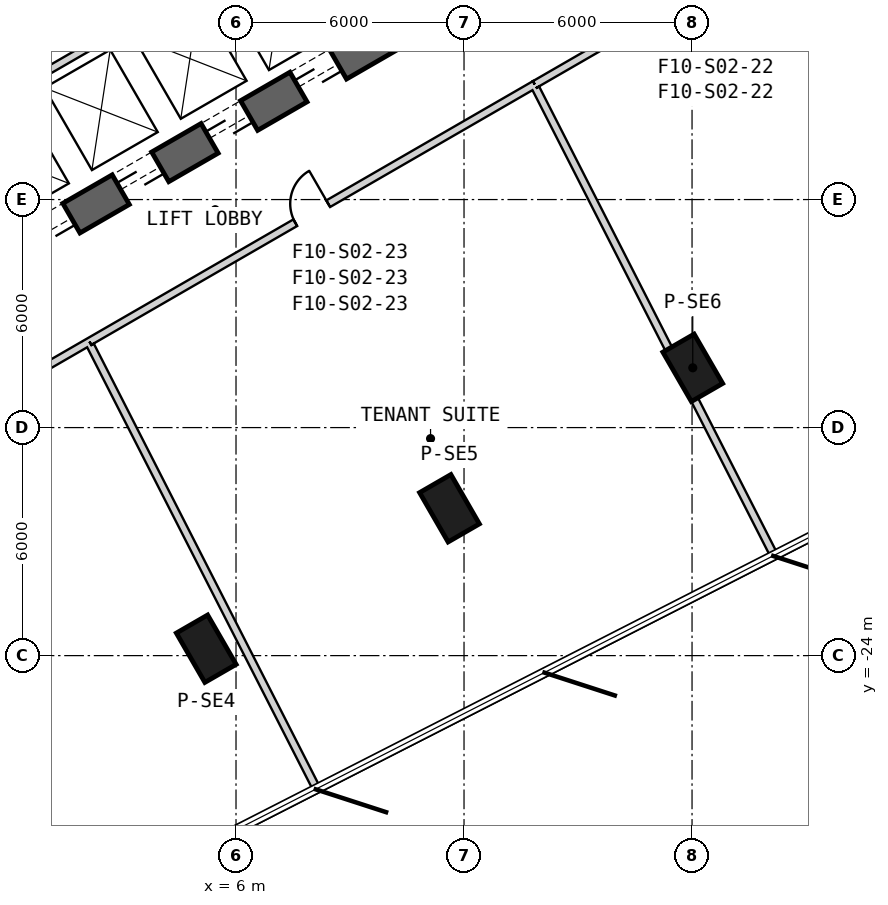
"""IFC4 building model, lengths in metres.
Left out: names, types, materials, properties, quantities, classifications, styles, units other than length and angle.
Written with IfcOpenShell. Run it as: python <this file> out.ifc"""

import sys

from ifc_helpers import new_model, si_unit, direction, frame, frame_2d, origin, origin_2d, place, context, subcontext, project, spatial, rectangle, extrude, element, fill, save


model = new_model("IFC4")
c1 = context("Model", 3, precision=1e-05, world=origin(), true_north=direction((0.0, 1.0)))
c2 = subcontext(c1, "Body", "Model", "MODEL_VIEW")
j1 = project(units=[si_unit("LENGTHUNIT", "METRE"), si_unit("PLANEANGLEUNIT", "RADIAN")], contexts=[c1])
p1 = place(None, origin())
s1 = spatial("IfcSite", under=j1, at=p1, CompositionType="ELEMENT")
p2 = place(p1, origin())
s2 = spatial("IfcBuilding", under=s1, at=p2, CompositionType="ELEMENT")
p3 = place(p2, frame((0.0, 0.0, 70.1)))
s3 = spatial("IfcBuildingStorey", under=s2, at=p3, CompositionType="ELEMENT", Elevation=70.1)
for number, where, z_axis, x_axis in (
    (1, (5.217, -23.818, 0.0), (0.0, 0.0, 1.0), (0.5, -0.866, 0.0)),
    (2, (11.618, -20.123, 0.0), (0.0, 0.0, 1.0), (0.5, -0.866, 0.0)),
    (3, (18.019, -16.427, 0.0), (0.0, 0.0, 1.0), (0.5, -0.866, 0.0)),
):
    element("IfcColumn", number, at=place(p3, frame(where, z_axis=z_axis, x_axis=x_axis)), inside=s3, PredefinedType="COLUMN", context=c2, shape_type="SweptSolid", body=[
        extrude(rectangle(XDim=1.5, YDim=0.95, at=origin_2d()), origin(), (0.0, 0.0, 1.0), 4.1),
    ])
p4 = place(p3, frame((-7.825, -17.97, 0.0), z_axis=(0.0, 0.0, 1.0), x_axis=(0.866028369851, 0.499994862586, 0.0)))
e4 = element("IfcWall", 4, at=p4, inside=s3, PredefinedType="SHEAR", context=c2, shape_type="SweptSolid", body=[
    extrude(rectangle(XDim=31.523, YDim=0.9, at=frame_2d((15.762, 0.0))), origin(), (0.0, 0.0, 1.0), 4.1),
])
p5 = place(p4, frame((7.062, 0.0, 0.0)))
e5 = element("IfcOpeningElement", 5, at=p5, cuts=e4, PredefinedType="OPENING", context=c2, shape_type="SweptSolid", body=[
    extrude(rectangle(XDim=1.2, YDim=2.4, at=frame_2d((0.6, 1.2))), frame((0.0, 0.46, 0.0), z_axis=(0.0, -1.0, 0.0), x_axis=(1.0, 0.0, 0.0)), (0.0, 0.0, 1.0), 0.92),
])
p6 = place(p4, frame((9.762, 0.0, 0.0)))
e6 = element("IfcOpeningElement", 6, at=p6, cuts=e4, PredefinedType="OPENING", context=c2, shape_type="SweptSolid", body=[
    extrude(rectangle(XDim=1.2, YDim=2.4, at=frame_2d((0.6, 1.2))), frame((0.0, 0.46, 0.0), z_axis=(0.0, -1.0, 0.0), x_axis=(1.0, 0.0, 0.0)), (0.0, 0.0, 1.0), 0.92),
])
p7 = place(p4, frame((12.462, 0.0, 0.0)))
e7 = element("IfcOpeningElement", 7, at=p7, cuts=e4, PredefinedType="OPENING", context=c2, shape_type="SweptSolid", body=[
    extrude(rectangle(XDim=1.2, YDim=2.4, at=frame_2d((0.6, 1.2))), frame((0.0, 0.46, 0.0), z_axis=(0.0, -1.0, 0.0), x_axis=(1.0, 0.0, 0.0)), (0.0, 0.0, 1.0), 0.92),
])
p8 = place(p4, frame((15.162, 0.0, 0.0)))
e8 = element("IfcOpeningElement", 8, at=p8, cuts=e4, PredefinedType="OPENING", context=c2, shape_type="SweptSolid", body=[
    extrude(rectangle(XDim=1.2, YDim=2.4, at=frame_2d((0.6, 1.2))), frame((0.0, 0.46, 0.0), z_axis=(0.0, -1.0, 0.0), x_axis=(1.0, 0.0, 0.0)), (0.0, 0.0, 1.0), 0.92),
])
p9 = place(p4, frame((17.862, 0.0, 0.0)))
e9 = element("IfcOpeningElement", 9, at=p9, cuts=e4, PredefinedType="OPENING", context=c2, shape_type="SweptSolid", body=[
    extrude(rectangle(XDim=1.2, YDim=2.4, at=frame_2d((0.6, 1.2))), frame((0.0, 0.46, 0.0), z_axis=(0.0, -1.0, 0.0), x_axis=(1.0, 0.0, 0.0)), (0.0, 0.0, 1.0), 0.92),
])
p10 = place(p4, frame((20.562, 0.0, 0.0)))
e10 = element("IfcOpeningElement", 10, at=p10, cuts=e4, PredefinedType="OPENING", context=c2, shape_type="SweptSolid", body=[
    extrude(rectangle(XDim=1.2, YDim=2.4, at=frame_2d((0.6, 1.2))), frame((0.0, 0.46, 0.0), z_axis=(0.0, -1.0, 0.0), x_axis=(1.0, 0.0, 0.0)), (0.0, 0.0, 1.0), 0.92),
])
p11 = place(p4, frame((26.712, 0.0, 0.0)))
e11 = element("IfcOpeningElement", 11, at=p11, cuts=e4, PredefinedType="OPENING", context=c2, shape_type="SweptSolid", body=[
    extrude(rectangle(XDim=1.2, YDim=2.4, at=frame_2d((0.6, 1.2))), frame((0.0, 0.46, 0.0), z_axis=(0.0, -1.0, 0.0), x_axis=(1.0, 0.0, 0.0)), (0.0, 0.0, 1.0), 0.92),
])
p12 = place(p4, frame((3.612, 0.0, 0.0)))
e12 = element("IfcOpeningElement", 12, at=p12, cuts=e4, PredefinedType="OPENING", context=c2, shape_type="SweptSolid", body=[
    extrude(rectangle(XDim=1.2, YDim=2.4, at=frame_2d((0.6, 1.2))), frame((0.0, 0.46, 0.0), z_axis=(0.0, -1.0, 0.0), x_axis=(1.0, 0.0, 0.0)), (0.0, 0.0, 1.0), 0.92),
])
p13 = place(p3, frame((0.483, -8.936, 0.0), z_axis=(0.0, 0.0, 1.0), x_axis=(0.866030989016, 0.499990325971, 0.0)))
e13 = element("IfcWall", 13, at=p13, inside=s3, PredefinedType="PLUMBINGWALL", context=c2, shape_type="SweptSolid", body=[
    extrude(rectangle(XDim=8.1, YDim=0.2, at=frame_2d((4.05, 0.0))), origin(), (0.0, 0.0, 1.0), 3.8),
])
p14 = place(p3, frame((-6.852, -20.93, 0.0), z_axis=(0.0, 0.0, 1.0), x_axis=(0.866021591072, 0.500006603753, 0.0)))
e14 = element("IfcWall", 14, at=p14, inside=s3, PredefinedType="PARTITIONING", context=c2, shape_type="SweptSolid", body=[
    extrude(rectangle(XDim=10.387, YDim=0.2, at=frame_2d((5.194, 0.0))), origin(), (0.0, 0.0, 1.0), 2.98),
])
p15 = place(p14, frame((4.732, 0.0, 0.0)))
e15 = element("IfcOpeningElement", 15, at=p15, cuts=e14, PredefinedType="OPENING", context=c2, shape_type="SweptSolid", body=[
    extrude(rectangle(XDim=1.0, YDim=2.1, at=frame_2d((0.5, 1.05))), frame((0.0, 0.11, 0.0), z_axis=(0.0, -1.0, 0.0), x_axis=(1.0, 0.0, 0.0)), (0.0, 0.0, 1.0), 0.22),
])
p16 = place(p3, frame((2.144, -15.737, 0.0), z_axis=(0.0, 0.0, 1.0), x_axis=(0.866019431537, 0.500010344094, 0.0)))
e16 = element("IfcWall", 16, at=p16, inside=s3, PredefinedType="PARTITIONING", context=c2, shape_type="SweptSolid", body=[
    extrude(rectangle(XDim=13.531, YDim=0.2, at=frame_2d((6.766, 0.0))), origin(), (0.0, 0.0, 1.0), 3.08),
])
p17 = place(p16, frame((6.254, 0.0, 0.0)))
e17 = element("IfcOpeningElement", 17, at=p17, cuts=e16, PredefinedType="OPENING", context=c2, shape_type="SweptSolid", body=[
    extrude(rectangle(XDim=1.0, YDim=2.1, at=frame_2d((0.5, 1.05))), frame((0.0, 0.11, 0.0), z_axis=(0.0, -1.0, 0.0), x_axis=(1.0, 0.0, 0.0)), (0.0, 0.0, 1.0), 0.22),
])
p18 = place(p3, frame((13.862, -8.971, 0.0), z_axis=(0.0, 0.0, 1.0), x_axis=(0.866032891431, 0.499987030792, 0.0)))
e18 = element("IfcWall", 18, at=p18, inside=s3, PredefinedType="PARTITIONING", context=c2, shape_type="SweptSolid", body=[
    extrude(rectangle(XDim=8.68, YDim=0.2, at=frame_2d((4.34, 0.0))), origin(), (0.0, 0.0, 1.0), 2.98),
])
p19 = place(p18, frame((3.84, 0.0, 0.0)))
e19 = element("IfcOpeningElement", 19, at=p19, cuts=e18, PredefinedType="OPENING", context=c2, shape_type="SweptSolid", body=[
    extrude(rectangle(XDim=1.0, YDim=2.1, at=frame_2d((0.5, 1.05))), frame((0.0, 0.11, 0.0), z_axis=(0.0, -1.0, 0.0), x_axis=(1.0, 0.0, 0.0)), (0.0, 0.0, 1.0), 0.22),
])
p20 = place(p3, frame((13.888, -9.071, 0.0), z_axis=(0.0, 0.0, 1.0), x_axis=(0.454417909926, -0.890788618663, 0.0)))
e20 = element("IfcWall", 20, at=p20, inside=s3, PredefinedType="PARTITIONING", context=c2, shape_type="SweptSolid", body=[
    extrude(rectangle(XDim=13.798, YDim=0.2, at=frame_2d((6.899, 0.0))), origin(), (0.0, 0.0, 1.0), 3.08),
])
p21 = place(p3, frame((8.121, -27.503, 0.0), z_axis=(0.0, 0.0, 1.0), x_axis=(-0.454409665836, 0.890792824171, 0.0)))
e21 = element("IfcWall", 21, at=p21, inside=s3, PredefinedType="PARTITIONING", context=c2, shape_type="SweptSolid", body=[
    extrude(rectangle(XDim=13.096, YDim=0.2, at=frame_2d((6.548, 0.0))), origin(), (0.0, 0.0, 1.0), 3.08),
])
p22 = place(p17, origin())
e22 = element("IfcDoor", 22, at=p22, inside=s3, OperationType="SINGLE_SWING_RIGHT", PredefinedType="USERDEFINED", context=c2, shape_type="SweptSolid", body=[
    extrude(rectangle(XDim=1.0, YDim=2.1, at=frame_2d((0.5, 1.05))), frame((0.0, 0.025, 0.0), z_axis=(0.0, -1.0, 0.0), x_axis=(1.0, 0.0, 0.0)), (0.0, 0.0, 1.0), 0.05),
])
fill(e17, e22)
p23 = place(p6, origin())
e23 = element("IfcDoor", 23, at=p23, inside=s3, OperationType="SLIDING_TO_LEFT", PredefinedType="USERDEFINED", context=c2, shape_type="SweptSolid", body=[
    extrude(rectangle(XDim=1.2, YDim=2.4, at=frame_2d((0.6, 1.2))), frame((0.0, 0.025, 0.0), z_axis=(0.0, -1.0, 0.0), x_axis=(1.0, 0.0, 0.0)), (0.0, 0.0, 1.0), 0.05),
])
fill(e6, e23)
p24 = place(p7, origin())
e24 = element("IfcDoor", 24, at=p24, inside=s3, OperationType="SLIDING_TO_LEFT", PredefinedType="USERDEFINED", context=c2, shape_type="SweptSolid", body=[
    extrude(rectangle(XDim=1.2, YDim=2.4, at=frame_2d((0.6, 1.2))), frame((0.0, 0.025, 0.0), z_axis=(0.0, -1.0, 0.0), x_axis=(1.0, 0.0, 0.0)), (0.0, 0.0, 1.0), 0.05),
])
fill(e7, e24)
p25 = place(p8, origin())
e25 = element("IfcDoor", 25, at=p25, inside=s3, OperationType="SLIDING_TO_LEFT", PredefinedType="USERDEFINED", context=c2, shape_type="SweptSolid", body=[
    extrude(rectangle(XDim=1.2, YDim=2.4, at=frame_2d((0.6, 1.2))), frame((0.0, 0.025, 0.0), z_axis=(0.0, -1.0, 0.0), x_axis=(1.0, 0.0, 0.0)), (0.0, 0.0, 1.0), 0.05),
])
fill(e8, e25)
p26 = place(p9, origin())
e26 = element("IfcDoor", 26, at=p26, inside=s3, OperationType="SLIDING_TO_LEFT", PredefinedType="USERDEFINED", context=c2, shape_type="SweptSolid", body=[
    extrude(rectangle(XDim=1.2, YDim=2.4, at=frame_2d((0.6, 1.2))), frame((0.0, 0.025, 0.0), z_axis=(0.0, -1.0, 0.0), x_axis=(1.0, 0.0, 0.0)), (0.0, 0.0, 1.0), 0.05),
])
fill(e9, e26)
save(model, sys.argv[1])
